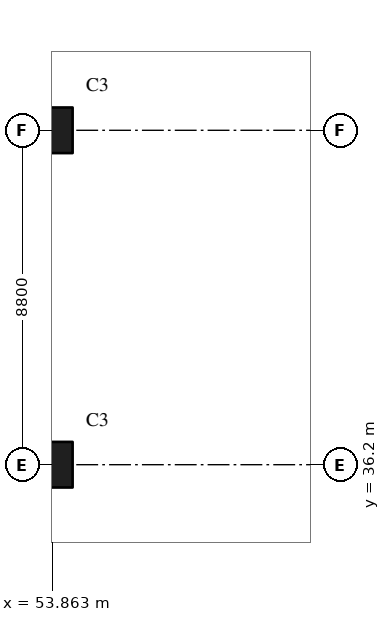
"""IFC4 building model, lengths in metres.
Left out: names, types, materials, properties, quantities, classifications, styles, units other than length and angle.
Written with IfcOpenShell. Run it as: python <this file> out.ifc"""

import sys

from ifc_helpers import new_model, si_unit, direction, frame, origin, origin_2d, place, context, subcontext, project, spatial, rectangle, extrude, element, save


model = new_model("IFC4")
c1 = context("Model", 3, precision=1e-05, world=origin(), true_north=direction((0.0, 1.0)))
c2 = subcontext(c1, "Body", "Model", "MODEL_VIEW")
j1 = project(units=[si_unit("LENGTHUNIT", "METRE"), si_unit("PLANEANGLEUNIT", "RADIAN")], contexts=[c1])
p1 = place(None, origin())
s1 = spatial("IfcSite", under=j1, at=p1, CompositionType="ELEMENT")
p2 = place(p1, origin())
s2 = spatial("IfcBuilding", under=s1, at=p2, CompositionType="ELEMENT")
p3 = place(p2, frame((0.0, 0.0, -12.0)))
s3 = spatial("IfcBuildingStorey", under=s2, at=p3, CompositionType="ELEMENT", Elevation=-12.0)
for number, where, z_axis, x_axis in (
    (1, (53.8, 36.2, 0.0), (0.0, 0.0, 1.0), (1.0, 0.0, 0.0)),
    (2, (53.8, 45.0, 0.0), (0.0, 0.0, 1.0), (1.0, 0.0, 0.0)),
):
    element("IfcColumn", number, at=place(p3, frame(where, z_axis=z_axis, x_axis=x_axis)), inside=s3, PredefinedType="COLUMN", context=c2, shape_type="SweptSolid", body=[
        extrude(rectangle(XDim=1.2, YDim=1.2, at=origin_2d()), origin(), (0.0, 0.0, 1.0), 5.0),
    ])
save(model, sys.argv[1])
